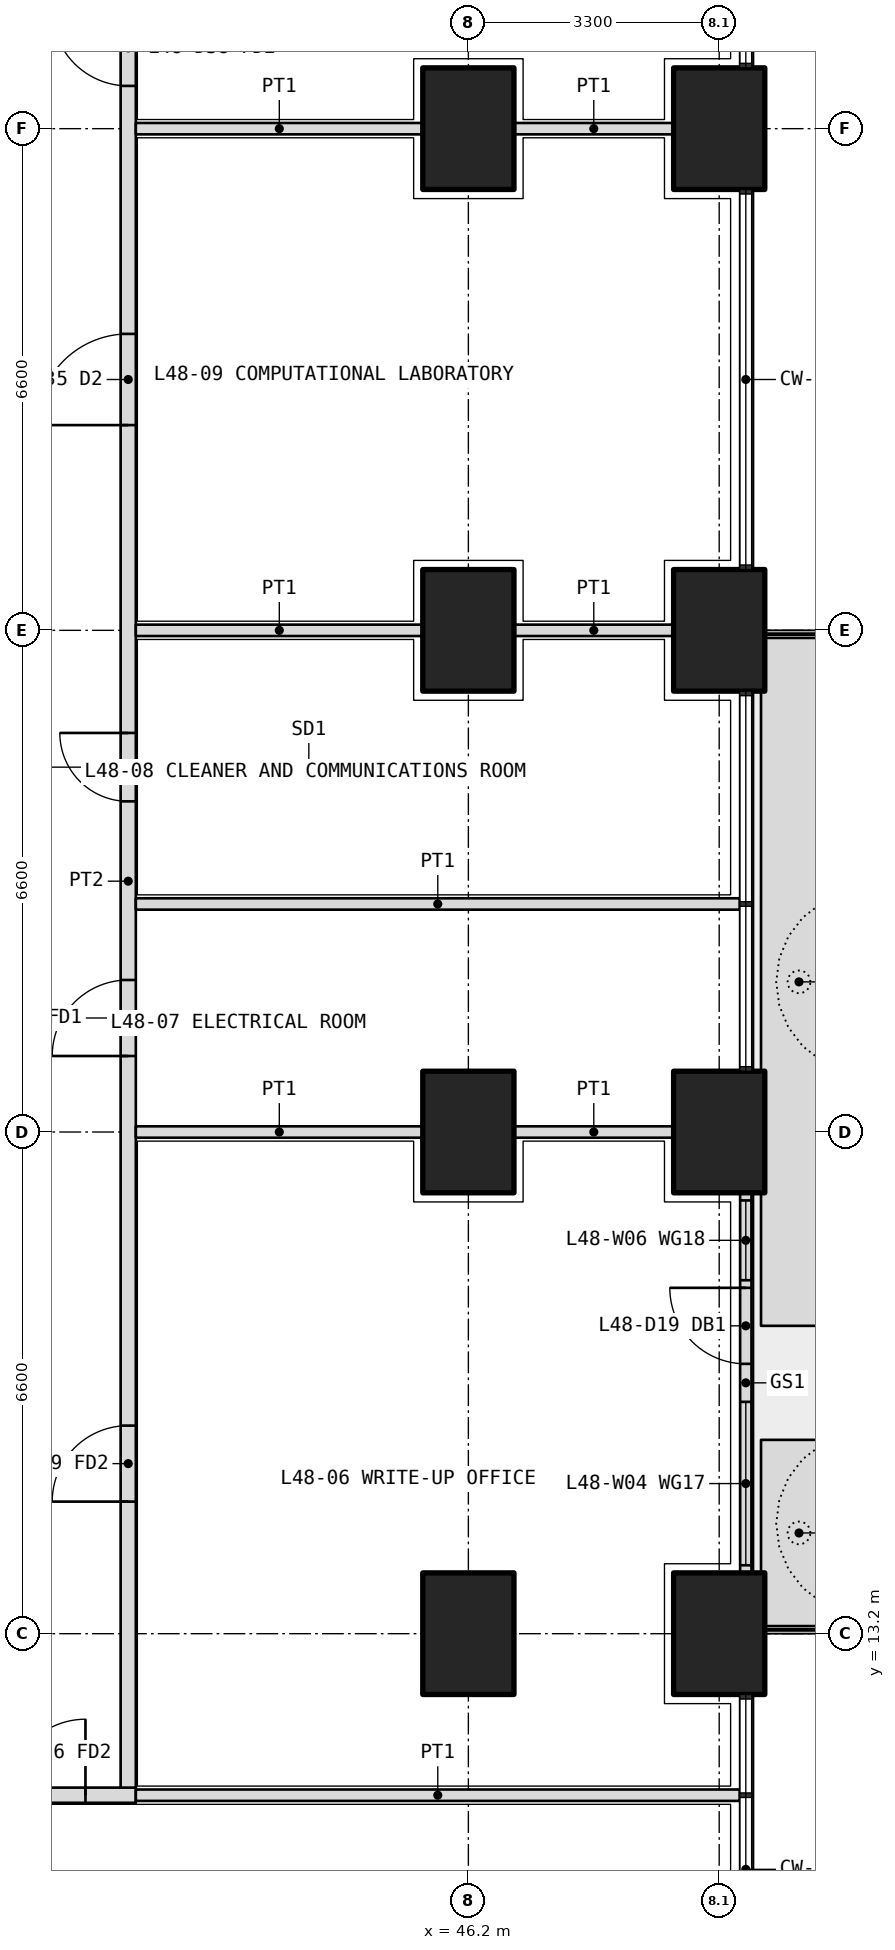
"""IFC4 building model, lengths in metres.
Left out: names, types, materials, properties, quantities, classifications, styles, units other than length and angle.
Written with IfcOpenShell. Run it as: python <this file> out.ifc"""

import sys

from ifc_helpers import new_model, si_unit, direction, frame, frame_2d, origin, origin_2d, place, context, subcontext, project, spatial, polyline, rectangle, outline, extrude, element, fill, save


model = new_model("IFC4")
c1 = context("Model", 3, precision=1e-05, world=origin(), true_north=direction((0.0, 1.0)))
c2 = subcontext(c1, "Body", "Model", "MODEL_VIEW")
j1 = project(units=[si_unit("LENGTHUNIT", "METRE"), si_unit("PLANEANGLEUNIT", "RADIAN")], contexts=[c1])
p1 = place(None, origin())
s1 = spatial("IfcSite", under=j1, at=p1, CompositionType="ELEMENT")
p2 = place(p1, origin())
s2 = spatial("IfcBuilding", under=s1, at=p2, CompositionType="ELEMENT")
p3 = place(p2, frame((0.0, 0.0, 210.3)))
s3 = spatial("IfcBuildingStorey", under=s2, at=p3, CompositionType="ELEMENT", Elevation=210.3)
for number, where, z_axis, x_axis in (
    (1, (49.5, 13.2, 0.0), (0.0, 0.0, 1.0), (0.0, 1.0, 0.0)),
    (2, (49.5, 19.8, 0.0), (0.0, 0.0, 1.0), (0.0, 1.0, 0.0)),
    (3, (49.5, 26.4, 0.0), (0.0, 0.0, 1.0), (0.0, 1.0, 0.0)),
    (4, (49.5, 33.0, 0.0), (0.0, 0.0, 1.0), (0.0, 1.0, 0.0)),
    (5, (46.2, 13.2, 0.0), (0.0, 0.0, 1.0), (0.0, 1.0, 0.0)),
    (6, (46.2, 19.8, 0.0), (0.0, 0.0, 1.0), (0.0, 1.0, 0.0)),
    (7, (46.2, 26.4, 0.0), (0.0, 0.0, 1.0), (0.0, 1.0, 0.0)),
    (8, (46.2, 33.0, 0.0), (0.0, 0.0, 1.0), (0.0, 1.0, 0.0)),
):
    element("IfcColumn", number, at=place(p3, frame(where, z_axis=z_axis, x_axis=x_axis)), inside=s3, PredefinedType="COLUMN", context=c2, shape_type="SweptSolid", body=[
        extrude(rectangle(XDim=1.6, YDim=1.2, at=origin_2d()), origin(), (0.0, 0.0, 1.0), 4.2),
    ])
p4 = place(p3, origin())
e9 = element("IfcWall", 9, at=p4, inside=s3, PredefinedType="USERDEFINED", context=c2, shape_type="SweptSolid", body=[
    extrude(outline(polyline([(50.05, 13.3), (51.05, 13.3), (51.05, 15.75), (50.05, 15.75), (50.05, 13.3)]), holes=[polyline([(50.2, 13.45), (50.9, 13.45), (50.9, 15.6), (50.2, 15.6), (50.2, 13.45)])]), origin(), (0.0, 0.0, 1.0), 1.05),
])
p5 = place(p3, origin())
e10 = element("IfcWall", 10, at=p5, inside=s3, PredefinedType="USERDEFINED", context=c2, shape_type="SweptSolid", body=[
    extrude(outline(polyline([(50.05, 17.25), (51.05, 17.25), (51.05, 26.3), (50.05, 26.3), (50.05, 17.25)]), holes=[polyline([(50.2, 17.4), (50.9, 17.4), (50.9, 26.15), (50.2, 26.15), (50.2, 17.4)])]), origin(), (0.0, 0.0, 1.0), 1.05),
])
p6 = place(p3, frame((49.85, 14.0, 0.0), z_axis=(0.0, 0.0, 1.0), x_axis=(0.0, 1.0, 0.0)))
e11 = element("IfcWall", 11, at=p6, inside=s3, PredefinedType="SOLIDWALL", context=c2, shape_type="SweptSolid", body=[
    extrude(rectangle(XDim=5.0, YDim=0.15, at=frame_2d((2.5, 0.0))), origin(), (0.0, 0.0, 1.0), 2.6),
])
p7 = place(p6, frame((2.75, 0.0, 0.0)))
e12 = element("IfcOpeningElement", 12, at=p7, cuts=e11, PredefinedType="OPENING", context=c2, shape_type="SweptSolid", body=[
    extrude(rectangle(XDim=1.0, YDim=2.4, at=frame_2d((0.5, 1.2))), frame((0.0, 0.085, 0.0), z_axis=(0.0, -1.0, 0.0), x_axis=(1.0, 0.0, 0.0)), (0.0, 0.0, 1.0), 0.17),
])
p8 = place(p6, frame((0.1, 0.0, 0.1)))
e13 = element("IfcOpeningElement", 13, at=p8, cuts=e11, PredefinedType="OPENING", context=c2, shape_type="SweptSolid", body=[
    extrude(rectangle(XDim=2.15, YDim=2.2, at=frame_2d((1.075, 1.1))), frame((0.0, 0.085, 0.0), z_axis=(0.0, -1.0, 0.0), x_axis=(1.0, 0.0, 0.0)), (0.0, 0.0, 1.0), 0.17),
])
p9 = place(p6, frame((3.85, 0.0, 0.1)))
e14 = element("IfcOpeningElement", 14, at=p9, cuts=e11, PredefinedType="OPENING", context=c2, shape_type="SweptSolid", body=[
    extrude(rectangle(XDim=1.05, YDim=2.2, at=frame_2d((0.525, 1.1))), frame((0.0, 0.085, 0.0), z_axis=(0.0, -1.0, 0.0), x_axis=(1.0, 0.0, 0.0)), (0.0, 0.0, 1.0), 0.17),
])
p10 = place(p3, frame((10.975, 11.075, 0.0), z_axis=(0.0, 0.0, 1.0), x_axis=(1.0, 0.0, 0.0)))
e15 = element("IfcWall", 15, at=p10, inside=s3, PredefinedType="PARTITIONING", context=c2, shape_type="SweptSolid", body=[
    extrude(rectangle(XDim=30.85, YDim=0.2, at=frame_2d((15.425, 0.0))), origin(), (0.0, 0.0, 1.0), 2.85),
])
p11 = place(p10, frame((2.312, 0.0, 0.0)))
e16 = element("IfcOpeningElement", 16, at=p11, cuts=e15, PredefinedType="OPENING", context=c2, shape_type="SweptSolid", body=[
    extrude(rectangle(XDim=1.0, YDim=2.1, at=frame_2d((0.5, 1.05))), frame((0.0, 0.11, 0.0), z_axis=(0.0, -1.0, 0.0), x_axis=(1.0, 0.0, 0.0)), (0.0, 0.0, 1.0), 0.22),
])
p12 = place(p10, frame((9.975, 0.0, 0.0)))
e17 = element("IfcOpeningElement", 17, at=p12, cuts=e15, PredefinedType="OPENING", context=c2, shape_type="SweptSolid", body=[
    extrude(rectangle(XDim=1.0, YDim=2.1, at=frame_2d((0.5, 1.05))), frame((0.0, 0.11, 0.0), z_axis=(0.0, -1.0, 0.0), x_axis=(1.0, 0.0, 0.0)), (0.0, 0.0, 1.0), 0.22),
])
p13 = place(p10, frame((16.575, 0.0, 0.0)))
e18 = element("IfcOpeningElement", 18, at=p13, cuts=e15, PredefinedType="OPENING", context=c2, shape_type="SweptSolid", body=[
    extrude(rectangle(XDim=1.0, YDim=2.1, at=frame_2d((0.5, 1.05))), frame((0.0, 0.11, 0.0), z_axis=(0.0, -1.0, 0.0), x_axis=(1.0, 0.0, 0.0)), (0.0, 0.0, 1.0), 0.22),
])
p14 = place(p10, frame((23.175, 0.0, 0.0)))
e19 = element("IfcOpeningElement", 19, at=p14, cuts=e15, PredefinedType="OPENING", context=c2, shape_type="SweptSolid", body=[
    extrude(rectangle(XDim=1.0, YDim=2.1, at=frame_2d((0.5, 1.05))), frame((0.0, 0.11, 0.0), z_axis=(0.0, -1.0, 0.0), x_axis=(1.0, 0.0, 0.0)), (0.0, 0.0, 1.0), 0.22),
])
p15 = place(p10, frame((29.188, 0.0, 0.0)))
e20 = element("IfcOpeningElement", 20, at=p15, cuts=e15, PredefinedType="OPENING", context=c2, shape_type="SweptSolid", body=[
    extrude(rectangle(XDim=1.0, YDim=2.1, at=frame_2d((0.5, 1.05))), frame((0.0, 0.11, 0.0), z_axis=(0.0, -1.0, 0.0), x_axis=(1.0, 0.0, 0.0)), (0.0, 0.0, 1.0), 0.22),
])
p16 = place(p3, frame((41.725, 11.175, 0.0), z_axis=(0.0, 0.0, 1.0), x_axis=(0.0, 1.0, 0.0)))
e21 = element("IfcWall", 21, at=p16, inside=s3, PredefinedType="PARTITIONING", context=c2, shape_type="SweptSolid", body=[
    extrude(rectangle(XDim=23.85, YDim=0.2, at=frame_2d((11.925, 0.0))), origin(), (0.0, 0.0, 1.0), 2.85),
])
p17 = place(p16, frame((3.762, 0.0, 0.0)))
e22 = element("IfcOpeningElement", 22, at=p17, cuts=e21, PredefinedType="OPENING", context=c2, shape_type="SweptSolid", body=[
    extrude(rectangle(XDim=1.0, YDim=2.1, at=frame_2d((0.5, 1.05))), frame((0.0, 0.11, 0.0), z_axis=(0.0, -1.0, 0.0), x_axis=(1.0, 0.0, 0.0)), (0.0, 0.0, 1.0), 0.22),
])
p18 = place(p16, frame((9.625, 0.0, 0.0)))
e23 = element("IfcOpeningElement", 23, at=p18, cuts=e21, PredefinedType="OPENING", context=c2, shape_type="SweptSolid", body=[
    extrude(rectangle(XDim=1.0, YDim=2.1, at=frame_2d((0.5, 1.05))), frame((0.0, 0.11, 0.0), z_axis=(0.0, -1.0, 0.0), x_axis=(1.0, 0.0, 0.0)), (0.0, 0.0, 1.0), 0.22),
])
p19 = place(p16, frame((12.975, 0.0, 0.0)))
e24 = element("IfcOpeningElement", 24, at=p19, cuts=e21, PredefinedType="OPENING", context=c2, shape_type="SweptSolid", body=[
    extrude(rectangle(XDim=0.9, YDim=2.1, at=frame_2d((0.45, 1.05))), frame((0.0, 0.11, 0.0), z_axis=(0.0, -1.0, 0.0), x_axis=(1.0, 0.0, 0.0)), (0.0, 0.0, 1.0), 0.22),
])
p20 = place(p16, frame((17.925, 0.0, 0.0)))
e25 = element("IfcOpeningElement", 25, at=p20, cuts=e21, PredefinedType="OPENING", context=c2, shape_type="SweptSolid", body=[
    extrude(rectangle(XDim=1.2, YDim=2.1, at=frame_2d((0.6, 1.05))), frame((0.0, 0.11, 0.0), z_axis=(0.0, -1.0, 0.0), x_axis=(1.0, 0.0, 0.0)), (0.0, 0.0, 1.0), 0.22),
])
p21 = place(p16, frame((22.387, 0.0, 0.0)))
e26 = element("IfcOpeningElement", 26, at=p21, cuts=e21, PredefinedType="OPENING", context=c2, shape_type="SweptSolid", body=[
    extrude(rectangle(XDim=1.0, YDim=2.1, at=frame_2d((0.5, 1.05))), frame((0.0, 0.11, 0.0), z_axis=(0.0, -1.0, 0.0), x_axis=(1.0, 0.0, 0.0)), (0.0, 0.0, 1.0), 0.22),
])
for number, where, z_axis, x_axis in (
    (27, (49.77, 11.075, 0.0), (0.0, 0.0, 1.0), (-1.0, 0.0, 0.0)),
    (28, (49.77, 22.8, 0.0), (0.0, 0.0, 1.0), (-1.0, 0.0, 0.0)),
):
    element("IfcWall", number, at=place(p3, frame(where, z_axis=z_axis, x_axis=x_axis)), inside=s3, PredefinedType="PARTITIONING", context=c2, shape_type="SweptSolid", body=[
        extrude(rectangle(XDim=7.945, YDim=0.15, at=frame_2d((3.973, 0.0))), origin(), (0.0, 0.0, 1.0), 2.6),
    ])
p22 = place(p3, frame((48.9, 26.4, 0.0), z_axis=(0.0, 0.0, 1.0), x_axis=(-1.0, 0.0, 0.0)))
e29 = element("IfcWall", 29, at=p22, inside=s3, PredefinedType="PARTITIONING", context=c2, shape_type="SweptSolid", body=[
    extrude(rectangle(XDim=2.1, YDim=0.15, at=frame_2d((1.05, 0.0))), origin(), (0.0, 0.0, 1.0), 2.85),
])
p23 = place(p3, frame((45.6, 26.4, 0.0), z_axis=(0.0, 0.0, 1.0), x_axis=(-1.0, 0.0, 0.0)))
e30 = element("IfcWall", 30, at=p23, inside=s3, PredefinedType="PARTITIONING", context=c2, shape_type="SweptSolid", body=[
    extrude(rectangle(XDim=3.775, YDim=0.15, at=frame_2d((1.888, 0.0))), origin(), (0.0, 0.0, 1.0), 2.85),
])
p24 = place(p3, frame((48.9, 19.8, 0.0), z_axis=(0.0, 0.0, 1.0), x_axis=(-1.0, 0.0, 0.0)))
e31 = element("IfcWall", 31, at=p24, inside=s3, PredefinedType="PARTITIONING", context=c2, shape_type="SweptSolid", body=[
    extrude(rectangle(XDim=2.1, YDim=0.15, at=frame_2d((1.05, 0.0))), origin(), (0.0, 0.0, 1.0), 2.85),
])
p25 = place(p3, frame((45.6, 19.8, 0.0), z_axis=(0.0, 0.0, 1.0), x_axis=(-1.0, 0.0, 0.0)))
e32 = element("IfcWall", 32, at=p25, inside=s3, PredefinedType="PARTITIONING", context=c2, shape_type="SweptSolid", body=[
    extrude(rectangle(XDim=3.775, YDim=0.15, at=frame_2d((1.888, 0.0))), origin(), (0.0, 0.0, 1.0), 2.85),
])
p26 = place(p3, frame((48.9, 33.0, 0.0), z_axis=(0.0, 0.0, 1.0), x_axis=(-1.0, 0.0, 0.0)))
e33 = element("IfcWall", 33, at=p26, inside=s3, PredefinedType="PARTITIONING", context=c2, shape_type="SweptSolid", body=[
    extrude(rectangle(XDim=2.1, YDim=0.15, at=frame_2d((1.05, 0.0))), origin(), (0.0, 0.0, 1.0), 2.85),
])
p27 = place(p3, frame((45.6, 33.0, 0.0), z_axis=(0.0, 0.0, 1.0), x_axis=(-1.0, 0.0, 0.0)))
e34 = element("IfcWall", 34, at=p27, inside=s3, PredefinedType="PARTITIONING", context=c2, shape_type="SweptSolid", body=[
    extrude(rectangle(XDim=3.775, YDim=0.15, at=frame_2d((1.888, 0.0))), origin(), (0.0, 0.0, 1.0), 2.85),
])
p28 = place(p7, origin())
e35 = element("IfcDoor", 35, at=p28, inside=s3, OperationType="SINGLE_SWING_RIGHT", PredefinedType="DOOR", context=c2, shape_type="SweptSolid", body=[
    extrude(rectangle(XDim=1.0, YDim=2.4, at=frame_2d((0.5, 1.2))), frame((0.0, 0.025, 0.0), z_axis=(0.0, -1.0, 0.0), x_axis=(1.0, 0.0, 0.0)), (0.0, 0.0, 1.0), 0.05),
])
fill(e12, e35)
p29 = place(p8, origin())
e36 = element("IfcWindow", 36, at=p29, inside=s3, PartitioningType="SINGLE_PANEL", PredefinedType="WINDOW", context=c2, shape_type="SweptSolid", body=[
    extrude(rectangle(XDim=2.15, YDim=2.2, at=frame_2d((1.075, 1.1))), frame((0.0, 0.03, 0.0), z_axis=(0.0, -1.0, 0.0), x_axis=(1.0, 0.0, 0.0)), (0.0, 0.0, 1.0), 0.06),
])
fill(e13, e36)
p30 = place(p9, origin())
e37 = element("IfcWindow", 37, at=p30, inside=s3, PartitioningType="SINGLE_PANEL", PredefinedType="WINDOW", context=c2, shape_type="SweptSolid", body=[
    extrude(rectangle(XDim=1.05, YDim=2.2, at=frame_2d((0.525, 1.1))), frame((0.0, 0.03, 0.0), z_axis=(0.0, -1.0, 0.0), x_axis=(1.0, 0.0, 0.0)), (0.0, 0.0, 1.0), 0.06),
])
fill(e14, e37)
p31 = place(p15, origin())
e38 = element("IfcDoor", 38, at=p31, inside=s3, OperationType="SINGLE_SWING_RIGHT", PredefinedType="DOOR", context=c2, shape_type="SweptSolid", body=[
    extrude(rectangle(XDim=1.0, YDim=2.1, at=frame_2d((0.5, 1.05))), frame((0.0, 0.025, 0.0), z_axis=(0.0, -1.0, 0.0), x_axis=(1.0, 0.0, 0.0)), (0.0, 0.0, 1.0), 0.05),
])
fill(e20, e38)
p32 = place(p17, origin())
e39 = element("IfcDoor", 39, at=p32, inside=s3, OperationType="SINGLE_SWING_LEFT", PredefinedType="DOOR", context=c2, shape_type="SweptSolid", body=[
    extrude(rectangle(XDim=1.0, YDim=2.1, at=frame_2d((0.5, 1.05))), frame((0.0, 0.025, 0.0), z_axis=(0.0, -1.0, 0.0), x_axis=(1.0, 0.0, 0.0)), (0.0, 0.0, 1.0), 0.05),
])
fill(e22, e39)
p33 = place(p18, origin())
e40 = element("IfcDoor", 40, at=p33, inside=s3, OperationType="SINGLE_SWING_LEFT", PredefinedType="DOOR", context=c2, shape_type="SweptSolid", body=[
    extrude(rectangle(XDim=1.0, YDim=2.1, at=frame_2d((0.5, 1.05))), frame((0.0, 0.025, 0.0), z_axis=(0.0, -1.0, 0.0), x_axis=(1.0, 0.0, 0.0)), (0.0, 0.0, 1.0), 0.05),
])
fill(e23, e40)
p34 = place(p19, origin())
e41 = element("IfcDoor", 41, at=p34, inside=s3, OperationType="SINGLE_SWING_RIGHT", PredefinedType="DOOR", context=c2, shape_type="SweptSolid", body=[
    extrude(rectangle(XDim=0.9, YDim=2.1, at=frame_2d((0.45, 1.05))), frame((0.0, 0.025, 0.0), z_axis=(0.0, -1.0, 0.0), x_axis=(1.0, 0.0, 0.0)), (0.0, 0.0, 1.0), 0.05),
])
fill(e24, e41)
p35 = place(p20, origin())
e42 = element("IfcDoor", 42, at=p35, inside=s3, OperationType="DOUBLE_DOOR_SINGLE_SWING", PredefinedType="DOOR", context=c2, shape_type="SweptSolid", body=[
    extrude(rectangle(XDim=1.2, YDim=2.1, at=frame_2d((0.6, 1.05))), frame((0.0, 0.025, 0.0), z_axis=(0.0, -1.0, 0.0), x_axis=(1.0, 0.0, 0.0)), (0.0, 0.0, 1.0), 0.05),
])
fill(e25, e42)
p36 = place(p21, origin())
e43 = element("IfcDoor", 43, at=p36, inside=s3, OperationType="SINGLE_SWING_RIGHT", PredefinedType="DOOR", context=c2, shape_type="SweptSolid", body=[
    extrude(rectangle(XDim=1.0, YDim=2.1, at=frame_2d((0.5, 1.05))), frame((0.0, 0.025, 0.0), z_axis=(0.0, -1.0, 0.0), x_axis=(1.0, 0.0, 0.0)), (0.0, 0.0, 1.0), 0.05),
])
fill(e26, e43)
save(model, sys.argv[1])
